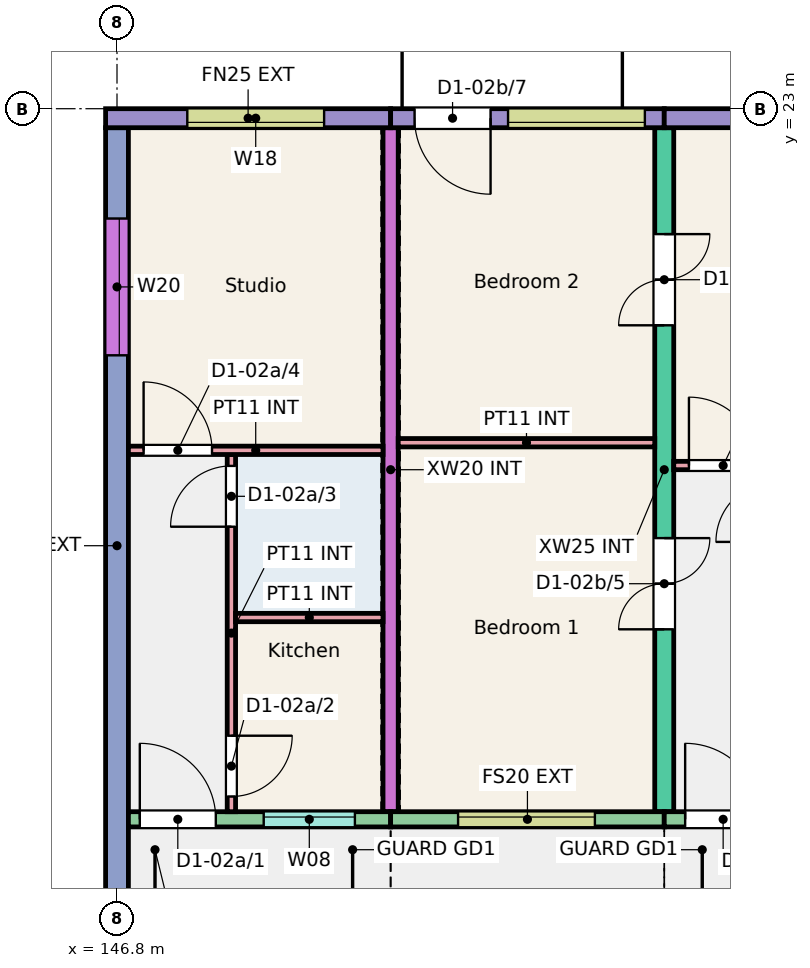
"""IFC4 building model, lengths in metres.
Left out: names, types, materials, properties, quantities, classifications, styles, units other than length and angle.
Written with IfcOpenShell. Run it as: python <this file> out.ifc"""

import sys

from ifc_helpers import new_model, si_unit, direction, frame, frame_2d, origin, place, context, subcontext, project, spatial, rectangle, extrude, element, fill, save


model = new_model("IFC4")
c1 = context("Model", 3, precision=1e-05, world=origin(), true_north=direction((0.0, 1.0)))
c2 = subcontext(c1, "Body", "Model", "MODEL_VIEW")
j1 = project(units=[si_unit("LENGTHUNIT", "METRE"), si_unit("PLANEANGLEUNIT", "RADIAN")], contexts=[c1])
p1 = place(None, origin())
s1 = spatial("IfcSite", under=j1, at=p1, CompositionType="ELEMENT")
p2 = place(p1, origin())
s2 = spatial("IfcBuilding", under=s1, at=p2, CompositionType="ELEMENT")
p3 = place(p2, frame((0.0, 0.0, 6.0)))
s3 = spatial("IfcBuildingStorey", under=s2, at=p3, CompositionType="ELEMENT", Elevation=6.0)
p4 = place(p3, frame((146.8, 11.75, 0.0), z_axis=(0.0, 0.0, 1.0), x_axis=(0.0, 1.0, 0.0)))
e1 = element("IfcWall", 1, at=p4, inside=s3, PredefinedType="SHEAR", context=c2, shape_type="SweptSolid", body=[
    extrude(rectangle(XDim=11.0, YDim=0.3, at=frame_2d((5.5, 0.0))), origin(), (0.0, 0.0, 1.0), 3.0),
])
p5 = place(p4, frame((8.005, 0.0, 0.9)))
e2 = element("IfcOpeningElement", 2, at=p5, cuts=e1, PredefinedType="OPENING", context=c2, shape_type="SweptSolid", body=[
    extrude(rectangle(XDim=1.8, YDim=1.5, at=frame_2d((0.9, 0.75))), frame((0.0, 0.16, 0.0), z_axis=(0.0, -1.0, 0.0), x_axis=(1.0, 0.0, 0.0)), (0.0, 0.0, 1.0), 0.32),
])
p6 = place(p3, frame((150.4, 13.75, 0.0), z_axis=(0.0, 0.0, 1.0), x_axis=(0.0, 1.0, 0.0)))
e3 = element("IfcWall", 3, at=p6, inside=s3, PredefinedType="SHEAR", context=c2, shape_type="SweptSolid", body=[
    extrude(rectangle(XDim=9.0, YDim=0.2, at=frame_2d((4.5, 0.0))), origin(), (0.0, 0.0, 1.0), 3.0),
])
p7 = place(p3, frame((154.0, 13.75, 0.0), z_axis=(0.0, 0.0, 1.0), x_axis=(0.0, 1.0, 0.0)))
e4 = element("IfcWall", 4, at=p7, inside=s3, PredefinedType="SHEAR", context=c2, shape_type="SweptSolid", body=[
    extrude(rectangle(XDim=9.0, YDim=0.25, at=frame_2d((4.5, 0.0))), origin(), (0.0, 0.0, 1.0), 3.0),
])
p8 = place(p7, frame((2.4, 0.0, 0.0)))
e5 = element("IfcOpeningElement", 5, at=p8, cuts=e4, PredefinedType="OPENING", context=c2, shape_type="SweptSolid", body=[
    extrude(rectangle(XDim=1.2, YDim=2.1, at=frame_2d((0.6, 1.05))), frame((0.0, 0.135, 0.0), z_axis=(0.0, -1.0, 0.0), x_axis=(1.0, 0.0, 0.0)), (0.0, 0.0, 1.0), 0.27),
])
p9 = place(p7, frame((6.4, 0.0, 0.0)))
e6 = element("IfcOpeningElement", 6, at=p9, cuts=e4, PredefinedType="OPENING", context=c2, shape_type="SweptSolid", body=[
    extrude(rectangle(XDim=1.2, YDim=2.1, at=frame_2d((0.6, 1.05))), frame((0.0, 0.135, 0.0), z_axis=(0.0, -1.0, 0.0), x_axis=(1.0, 0.0, 0.0)), (0.0, 0.0, 1.0), 0.27),
])
p10 = place(p3, frame((146.65, 22.875, 0.0), z_axis=(0.0, 0.0, 1.0), x_axis=(1.0, 0.0, 0.0)))
e7 = element("IfcWall", 7, at=p10, inside=s3, PredefinedType="SOLIDWALL", context=c2, shape_type="SweptSolid", body=[
    extrude(rectangle(XDim=3.75, YDim=0.25, at=frame_2d((1.875, 0.0))), origin(), (0.0, 0.0, 1.0), 3.0),
])
p11 = place(p10, frame((1.075, 0.0, 1.1)))
e8 = element("IfcOpeningElement", 8, at=p11, cuts=e7, PredefinedType="OPENING", context=c2, shape_type="SweptSolid", body=[
    extrude(rectangle(XDim=1.8, YDim=1.3, at=frame_2d((0.9, 0.65))), frame((0.0, 0.135, 0.0), z_axis=(0.0, -1.0, 0.0), x_axis=(1.0, 0.0, 0.0)), (0.0, 0.0, 1.0), 0.27),
])
p12 = place(p3, frame((146.95, 13.65, 0.0), z_axis=(0.0, 0.0, 1.0), x_axis=(1.0, 0.0, 0.0)))
e9 = element("IfcWall", 9, at=p12, inside=s3, PredefinedType="SOLIDWALL", context=c2, shape_type="SweptSolid", body=[
    extrude(rectangle(XDim=3.45, YDim=0.2, at=frame_2d((1.725, 0.0))), origin(), (0.0, 0.0, 1.0), 3.0),
])
p13 = place(p12, frame((1.78, 0.0, 1.1)))
e10 = element("IfcOpeningElement", 10, at=p13, cuts=e9, PredefinedType="OPENING", context=c2, shape_type="SweptSolid", body=[
    extrude(rectangle(XDim=1.2, YDim=1.3, at=frame_2d((0.6, 0.65))), frame((0.0, 0.11, 0.0), z_axis=(0.0, -1.0, 0.0), x_axis=(1.0, 0.0, 0.0)), (0.0, 0.0, 1.0), 0.22),
])
p14 = place(p12, frame((0.15, 0.0, 0.0)))
e11 = element("IfcOpeningElement", 11, at=p14, cuts=e9, PredefinedType="OPENING", context=c2, shape_type="SweptSolid", body=[
    extrude(rectangle(XDim=1.0, YDim=2.1, at=frame_2d((0.5, 1.05))), frame((0.0, 0.11, 0.0), z_axis=(0.0, -1.0, 0.0), x_axis=(1.0, 0.0, 0.0)), (0.0, 0.0, 1.0), 0.22),
])
p15 = place(p3, frame((150.4, 22.875, 0.0), z_axis=(0.0, 0.0, 1.0), x_axis=(1.0, 0.0, 0.0)))
e12 = element("IfcWall", 12, at=p15, inside=s3, PredefinedType="SOLIDWALL", context=c2, shape_type="SweptSolid", body=[
    extrude(rectangle(XDim=3.6, YDim=0.25, at=frame_2d((1.8, 0.0))), origin(), (0.0, 0.0, 1.0), 3.0),
])
p16 = place(p15, frame((1.545, 0.0, 1.1)))
e13 = element("IfcOpeningElement", 13, at=p16, cuts=e12, PredefinedType="OPENING", context=c2, shape_type="SweptSolid", body=[
    extrude(rectangle(XDim=1.8, YDim=1.3, at=frame_2d((0.9, 0.65))), frame((0.0, 0.135, 0.0), z_axis=(0.0, -1.0, 0.0), x_axis=(1.0, 0.0, 0.0)), (0.0, 0.0, 1.0), 0.27),
])
p17 = place(p15, frame((0.315, 0.0, 0.0)))
e14 = element("IfcOpeningElement", 14, at=p17, cuts=e12, PredefinedType="OPENING", context=c2, shape_type="SweptSolid", body=[
    extrude(rectangle(XDim=1.0, YDim=2.1, at=frame_2d((0.5, 1.05))), frame((0.0, 0.135, 0.0), z_axis=(0.0, -1.0, 0.0), x_axis=(1.0, 0.0, 0.0)), (0.0, 0.0, 1.0), 0.27),
])
p18 = place(p3, frame((150.4, 13.65, 0.0), z_axis=(0.0, 0.0, 1.0), x_axis=(1.0, 0.0, 0.0)))
e15 = element("IfcWall", 15, at=p18, inside=s3, PredefinedType="SOLIDWALL", context=c2, shape_type="SweptSolid", body=[
    extrude(rectangle(XDim=3.6, YDim=0.2, at=frame_2d((1.8, 0.0))), origin(), (0.0, 0.0, 1.0), 3.0),
])
p19 = place(p18, frame((0.887, 0.0, 1.1)))
e16 = element("IfcOpeningElement", 16, at=p19, cuts=e15, PredefinedType="OPENING", context=c2, shape_type="SweptSolid", body=[
    extrude(rectangle(XDim=1.8, YDim=1.3, at=frame_2d((0.9, 0.65))), frame((0.0, 0.11, 0.0), z_axis=(0.0, -1.0, 0.0), x_axis=(1.0, 0.0, 0.0)), (0.0, 0.0, 1.0), 0.22),
])
p20 = place(p3, frame((154.0, 22.875, 0.0), z_axis=(0.0, 0.0, 1.0), x_axis=(1.0, 0.0, 0.0)))
e17 = element("IfcWall", 17, at=p20, inside=s3, PredefinedType="SOLIDWALL", context=c2, shape_type="SweptSolid", body=[
    extrude(rectangle(XDim=3.6, YDim=0.25, at=frame_2d((1.8, 0.0))), origin(), (0.0, 0.0, 1.0), 3.0),
])
p21 = place(p20, frame((0.9, 0.0, 1.1)))
e18 = element("IfcOpeningElement", 18, at=p21, cuts=e17, PredefinedType="OPENING", context=c2, shape_type="SweptSolid", body=[
    extrude(rectangle(XDim=1.8, YDim=1.3, at=frame_2d((0.9, 0.65))), frame((0.0, 0.135, 0.0), z_axis=(0.0, -1.0, 0.0), x_axis=(1.0, 0.0, 0.0)), (0.0, 0.0, 1.0), 0.27),
])
p22 = place(p3, frame((154.0, 13.65, 0.0), z_axis=(0.0, 0.0, 1.0), x_axis=(1.0, 0.0, 0.0)))
e19 = element("IfcWall", 19, at=p22, inside=s3, PredefinedType="SOLIDWALL", context=c2, shape_type="SweptSolid", body=[
    extrude(rectangle(XDim=3.6, YDim=0.2, at=frame_2d((1.8, 0.0))), origin(), (0.0, 0.0, 1.0), 3.0),
])
p23 = place(p22, frame((1.905, 0.0, 1.1)))
e20 = element("IfcOpeningElement", 20, at=p23, cuts=e19, PredefinedType="OPENING", context=c2, shape_type="SweptSolid", body=[
    extrude(rectangle(XDim=1.2, YDim=1.3, at=frame_2d((0.6, 0.65))), frame((0.0, 0.11, 0.0), z_axis=(0.0, -1.0, 0.0), x_axis=(1.0, 0.0, 0.0)), (0.0, 0.0, 1.0), 0.22),
])
p24 = place(p22, frame((0.275, 0.0, 0.0)))
e21 = element("IfcOpeningElement", 21, at=p24, cuts=e19, PredefinedType="OPENING", context=c2, shape_type="SweptSolid", body=[
    extrude(rectangle(XDim=1.0, YDim=2.1, at=frame_2d((0.5, 1.05))), frame((0.0, 0.11, 0.0), z_axis=(0.0, -1.0, 0.0), x_axis=(1.0, 0.0, 0.0)), (0.0, 0.0, 1.0), 0.22),
])
p25 = place(p3, frame((148.305, 13.75, 0.0), z_axis=(0.0, 0.0, 1.0), x_axis=(0.0, 1.0, 0.0)))
e22 = element("IfcWall", 22, at=p25, inside=s3, PredefinedType="PARTITIONING", context=c2, shape_type="SweptSolid", body=[
    extrude(rectangle(XDim=4.7, YDim=0.11, at=frame_2d((2.35, 0.0))), origin(), (0.0, 0.0, 1.0), 2.8),
])
p26 = place(p25, frame((0.2, 0.0, 0.0)))
e23 = element("IfcOpeningElement", 23, at=p26, cuts=e22, PredefinedType="OPENING", context=c2, shape_type="SweptSolid", body=[
    extrude(rectangle(XDim=0.8, YDim=2.1, at=frame_2d((0.4, 1.05))), frame((0.0, 0.065, 0.0), z_axis=(0.0, -1.0, 0.0), x_axis=(1.0, 0.0, 0.0)), (0.0, 0.0, 1.0), 0.13),
])
p27 = place(p25, frame((3.75, 0.0, 0.0)))
e24 = element("IfcOpeningElement", 24, at=p27, cuts=e22, PredefinedType="OPENING", context=c2, shape_type="SweptSolid", body=[
    extrude(rectangle(XDim=0.8, YDim=2.1, at=frame_2d((0.4, 1.05))), frame((0.0, 0.065, 0.0), z_axis=(0.0, -1.0, 0.0), x_axis=(1.0, 0.0, 0.0)), (0.0, 0.0, 1.0), 0.13),
])
p28 = place(p3, frame((148.36, 16.305, 0.0), z_axis=(0.0, 0.0, 1.0), x_axis=(1.0, 0.0, 0.0)))
e25 = element("IfcWall", 25, at=p28, inside=s3, PredefinedType="PARTITIONING", context=c2, shape_type="SweptSolid", body=[
    extrude(rectangle(XDim=1.94, YDim=0.11, at=frame_2d((0.97, 0.0))), origin(), (0.0, 0.0, 1.0), 2.8),
])
p29 = place(p3, frame((146.95, 18.505, 0.0), z_axis=(0.0, 0.0, 1.0), x_axis=(1.0, 0.0, 0.0)))
e26 = element("IfcWall", 26, at=p29, inside=s3, PredefinedType="PARTITIONING", context=c2, shape_type="SweptSolid", body=[
    extrude(rectangle(XDim=3.35, YDim=0.11, at=frame_2d((1.675, 0.0))), origin(), (0.0, 0.0, 1.0), 2.8),
])
p30 = place(p29, frame((0.2, 0.0, 0.0)))
e27 = element("IfcOpeningElement", 27, at=p30, cuts=e26, PredefinedType="OPENING", context=c2, shape_type="SweptSolid", body=[
    extrude(rectangle(XDim=0.9, YDim=2.1, at=frame_2d((0.45, 1.05))), frame((0.0, 0.065, 0.0), z_axis=(0.0, -1.0, 0.0), x_axis=(1.0, 0.0, 0.0)), (0.0, 0.0, 1.0), 0.13),
])
p31 = place(p3, frame((154.125, 18.305, 0.0), z_axis=(0.0, 0.0, 1.0), x_axis=(1.0, 0.0, 0.0)))
e28 = element("IfcWall", 28, at=p31, inside=s3, PredefinedType="PARTITIONING", context=c2, shape_type="SweptSolid", body=[
    extrude(rectangle(XDim=3.35, YDim=0.11, at=frame_2d((1.675, 0.0))), origin(), (0.0, 0.0, 1.0), 2.8),
])
p32 = place(p31, frame((0.2, 0.0, 0.0)))
e29 = element("IfcOpeningElement", 29, at=p32, cuts=e28, PredefinedType="OPENING", context=c2, shape_type="SweptSolid", body=[
    extrude(rectangle(XDim=0.9, YDim=2.1, at=frame_2d((0.45, 1.05))), frame((0.0, 0.065, 0.0), z_axis=(0.0, -1.0, 0.0), x_axis=(1.0, 0.0, 0.0)), (0.0, 0.0, 1.0), 0.13),
])
p33 = place(p3, frame((150.5, 18.605, 0.0), z_axis=(0.0, 0.0, 1.0), x_axis=(1.0, 0.0, 0.0)))
e30 = element("IfcWall", 30, at=p33, inside=s3, PredefinedType="PARTITIONING", context=c2, shape_type="SweptSolid", body=[
    extrude(rectangle(XDim=3.375, YDim=0.11, at=frame_2d((1.688, 0.0))), origin(), (0.0, 0.0, 1.0), 2.8),
])
p34 = place(p13, origin())
e31 = element("IfcWindow", 31, at=p34, inside=s3, PartitioningType="SINGLE_PANEL", PredefinedType="WINDOW", context=c2, shape_type="SweptSolid", body=[
    extrude(rectangle(XDim=1.2, YDim=1.3, at=frame_2d((0.6, 0.65))), frame((0.0, 0.06, 0.0), z_axis=(0.0, -1.0, 0.0), x_axis=(1.0, 0.0, 0.0)), (0.0, 0.0, 1.0), 0.06),
])
fill(e10, e31)
p35 = place(p11, origin())
e32 = element("IfcWindow", 32, at=p35, inside=s3, PartitioningType="SINGLE_PANEL", PredefinedType="WINDOW", context=c2, shape_type="SweptSolid", body=[
    extrude(rectangle(XDim=1.8, YDim=1.3, at=frame_2d((0.9, 0.65))), frame((0.0, -0.025, 0.0), z_axis=(0.0, -1.0, 0.0), x_axis=(1.0, 0.0, 0.0)), (0.0, 0.0, 1.0), 0.06),
])
fill(e8, e32)
p36 = place(p5, origin())
e33 = element("IfcWindow", 33, at=p36, inside=s3, PartitioningType="SINGLE_PANEL", PredefinedType="WINDOW", context=c2, shape_type="SweptSolid", body=[
    extrude(rectangle(XDim=1.8, YDim=1.5, at=frame_2d((0.9, 0.75))), frame((0.0, 0.0, 0.0), z_axis=(0.0, -1.0, 0.0), x_axis=(1.0, 0.0, 0.0)), (0.0, 0.0, 1.0), 0.06),
])
fill(e2, e33)
p37 = place(p19, origin())
e34 = element("IfcWindow", 34, at=p37, inside=s3, PartitioningType="SINGLE_PANEL", PredefinedType="WINDOW", context=c2, shape_type="SweptSolid", body=[
    extrude(rectangle(XDim=1.8, YDim=1.3, at=frame_2d((0.9, 0.65))), frame((0.0, 0.06, 0.0), z_axis=(0.0, -1.0, 0.0), x_axis=(1.0, 0.0, 0.0)), (0.0, 0.0, 1.0), 0.06),
])
fill(e16, e34)
p38 = place(p16, origin())
e35 = element("IfcWindow", 35, at=p38, inside=s3, PartitioningType="SINGLE_PANEL", PredefinedType="WINDOW", context=c2, shape_type="SweptSolid", body=[
    extrude(rectangle(XDim=1.8, YDim=1.3, at=frame_2d((0.9, 0.65))), frame((0.0, -0.025, 0.0), z_axis=(0.0, -1.0, 0.0), x_axis=(1.0, 0.0, 0.0)), (0.0, 0.0, 1.0), 0.06),
])
fill(e13, e35)
p39 = place(p14, origin())
e36 = element("IfcDoor", 36, at=p39, inside=s3, OperationType="SINGLE_SWING_LEFT", PredefinedType="DOOR", context=c2, shape_type="SweptSolid", body=[
    extrude(rectangle(XDim=1.0, YDim=2.1, at=frame_2d((0.5, 1.05))), frame((0.0, 0.025, 0.0), z_axis=(0.0, -1.0, 0.0), x_axis=(1.0, 0.0, 0.0)), (0.0, 0.0, 1.0), 0.05),
])
fill(e11, e36)
p40 = place(p26, origin())
e37 = element("IfcDoor", 37, at=p40, inside=s3, OperationType="SINGLE_SWING_RIGHT", PredefinedType="DOOR", context=c2, shape_type="SweptSolid", body=[
    extrude(rectangle(XDim=0.8, YDim=2.1, at=frame_2d((0.4, 1.05))), frame((0.0, 0.025, 0.0), z_axis=(0.0, -1.0, 0.0), x_axis=(1.0, 0.0, 0.0)), (0.0, 0.0, 1.0), 0.05),
])
fill(e23, e37)
p41 = place(p27, origin())
e38 = element("IfcDoor", 38, at=p41, inside=s3, OperationType="SINGLE_SWING_LEFT", PredefinedType="DOOR", context=c2, shape_type="SweptSolid", body=[
    extrude(rectangle(XDim=0.8, YDim=2.1, at=frame_2d((0.4, 1.05))), frame((0.0, 0.025, 0.0), z_axis=(0.0, -1.0, 0.0), x_axis=(1.0, 0.0, 0.0)), (0.0, 0.0, 1.0), 0.05),
])
fill(e24, e38)
p42 = place(p30, origin())
e39 = element("IfcDoor", 39, at=p42, inside=s3, OperationType="SINGLE_SWING_LEFT", PredefinedType="DOOR", context=c2, shape_type="SweptSolid", body=[
    extrude(rectangle(XDim=0.9, YDim=2.1, at=frame_2d((0.45, 1.05))), frame((0.0, 0.025, 0.0), z_axis=(0.0, -1.0, 0.0), x_axis=(1.0, 0.0, 0.0)), (0.0, 0.0, 1.0), 0.05),
])
fill(e27, e39)
p43 = place(p24, origin())
e40 = element("IfcDoor", 40, at=p43, inside=s3, OperationType="SINGLE_SWING_LEFT", PredefinedType="DOOR", context=c2, shape_type="SweptSolid", body=[
    extrude(rectangle(XDim=1.0, YDim=2.1, at=frame_2d((0.5, 1.05))), frame((0.0, 0.025, 0.0), z_axis=(0.0, -1.0, 0.0), x_axis=(1.0, 0.0, 0.0)), (0.0, 0.0, 1.0), 0.05),
])
fill(e21, e40)
p44 = place(p32, origin())
e41 = element("IfcDoor", 41, at=p44, inside=s3, OperationType="SINGLE_SWING_LEFT", PredefinedType="DOOR", context=c2, shape_type="SweptSolid", body=[
    extrude(rectangle(XDim=0.9, YDim=2.1, at=frame_2d((0.45, 1.05))), frame((0.0, 0.025, 0.0), z_axis=(0.0, -1.0, 0.0), x_axis=(1.0, 0.0, 0.0)), (0.0, 0.0, 1.0), 0.05),
])
fill(e29, e41)
p45 = place(p8, origin())
e42 = element("IfcDoor", 42, at=p45, inside=s3, OperationType="DOUBLE_DOOR_SINGLE_SWING", PredefinedType="DOOR", context=c2, shape_type="SweptSolid", body=[
    extrude(rectangle(XDim=1.2, YDim=2.1, at=frame_2d((0.6, 1.05))), frame((0.0, 0.025, 0.0), z_axis=(0.0, -1.0, 0.0), x_axis=(1.0, 0.0, 0.0)), (0.0, 0.0, 1.0), 0.05),
])
fill(e5, e42)
p46 = place(p9, origin())
e43 = element("IfcDoor", 43, at=p46, inside=s3, OperationType="DOUBLE_DOOR_SINGLE_SWING", PredefinedType="DOOR", context=c2, shape_type="SweptSolid", body=[
    extrude(rectangle(XDim=1.2, YDim=2.1, at=frame_2d((0.6, 1.05))), frame((0.0, 0.025, 0.0), z_axis=(0.0, -1.0, 0.0), x_axis=(1.0, 0.0, 0.0)), (0.0, 0.0, 1.0), 0.05),
])
fill(e6, e43)
p47 = place(p17, origin())
e44 = element("IfcDoor", 44, at=p47, inside=s3, OperationType="SINGLE_SWING_RIGHT", PredefinedType="DOOR", context=c2, shape_type="SweptSolid", body=[
    extrude(rectangle(XDim=1.0, YDim=2.1, at=frame_2d((0.5, 1.05))), frame((0.0, 0.025, 0.0), z_axis=(0.0, -1.0, 0.0), x_axis=(1.0, 0.0, 0.0)), (0.0, 0.0, 1.0), 0.05),
])
fill(e14, e44)
save(model, sys.argv[1])
